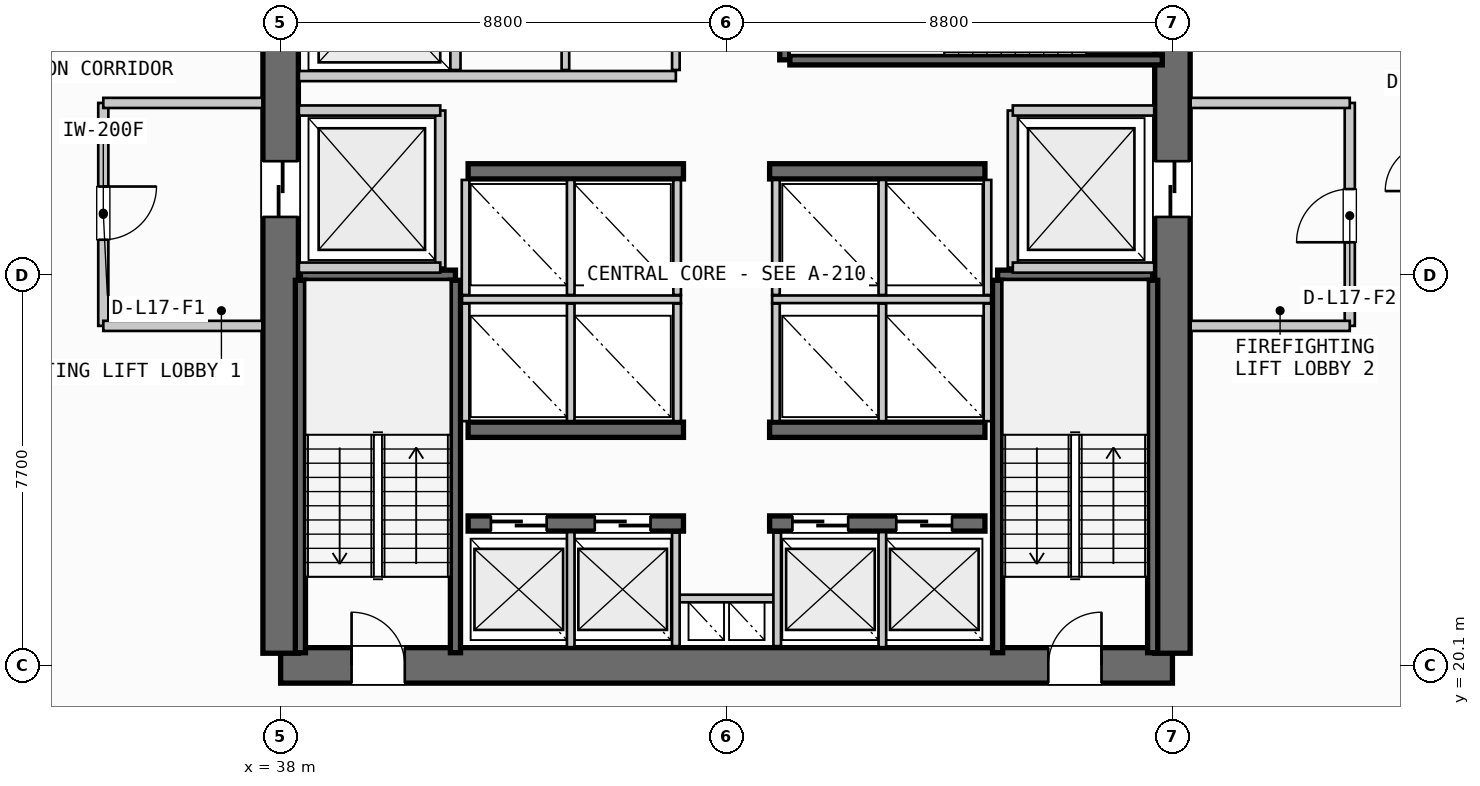
"""IFC4 building model, lengths in metres.
Left out: names, types, materials, properties, quantities, classifications, styles, units other than length and angle.
Written with IfcOpenShell. Run it as: python <this file> out.ifc"""

import sys

from ifc_helpers import new_model, si_unit, direction, frame, frame_2d, origin, place, context, subcontext, project, spatial, rectangle, extrude, source, transform, mapped, element, fill, save


model = new_model("IFC4")
c1 = context("Model", 3, precision=1e-05, world=origin(), true_north=direction((0.0, 1.0)))
c2 = subcontext(c1, "Body", "Model", "MODEL_VIEW")
j1 = project(units=[si_unit("LENGTHUNIT", "METRE"), si_unit("PLANEANGLEUNIT", "RADIAN")], contexts=[c1])
p1 = place(None, origin())
s1 = spatial("IfcSite", under=j1, at=p1, CompositionType="ELEMENT")
p2 = place(p1, origin())
s2 = spatial("IfcBuilding", under=s1, at=p2, CompositionType="ELEMENT")
p3 = place(p2, frame((0.0, 0.0, 71.4)))
s3 = spatial("IfcBuildingStorey", under=s2, at=p3, CompositionType="ELEMENT", Elevation=71.4)
p4 = place(p3, frame((38.0, 20.1, 0.0), z_axis=(0.0, 0.0, 1.0), x_axis=(1.0, 0.0, 0.0)))
e1 = element("IfcWall", 1, at=p4, inside=s3, PredefinedType="SHEAR", context=c2, shape_type="SweptSolid", body=[
    extrude(rectangle(XDim=17.6, YDim=0.7, at=frame_2d((8.8, 0.0))), origin(), (0.0, 0.0, 1.0), 3.54),
])
p5 = place(p4, frame((1.4, 0.0, 0.0)))
e2 = element("IfcOpeningElement", 2, at=p5, cuts=e1, PredefinedType="OPENING", context=c2, shape_type="SweptSolid", body=[
    extrude(rectangle(XDim=1.05, YDim=2.15, at=frame_2d((0.525, 1.075))), frame((0.0, 0.36, 0.0), z_axis=(0.0, -1.0, 0.0), x_axis=(1.0, 0.0, 0.0)), (0.0, 0.0, 1.0), 0.72),
])
p6 = place(p4, frame((15.15, 0.0, 0.0)))
e3 = element("IfcOpeningElement", 3, at=p6, cuts=e1, PredefinedType="OPENING", context=c2, shape_type="SweptSolid", body=[
    extrude(rectangle(XDim=1.05, YDim=2.15, at=frame_2d((0.525, 1.075))), frame((0.0, 0.36, 0.0), z_axis=(0.0, -1.0, 0.0), x_axis=(1.0, 0.0, 0.0)), (0.0, 0.0, 1.0), 0.72),
])
p7 = place(p3, frame((38.0, 35.26, 0.0), z_axis=(0.0, 0.0, 1.0), x_axis=(0.0, -1.0, 0.0)))
e4 = element("IfcWall", 4, at=p7, inside=s3, PredefinedType="SHEAR", context=c2, shape_type="SweptSolid", body=[
    extrude(rectangle(XDim=14.92, YDim=0.7, at=frame_2d((7.46, 0.0))), origin(), (0.0, 0.0, 1.0), 3.54),
])
p8 = place(p7, frame((5.21, 0.0, 0.0)))
e5 = element("IfcOpeningElement", 5, at=p8, cuts=e4, PredefinedType="OPENING", context=c2, shape_type="SweptSolid", body=[
    extrude(rectangle(XDim=1.1, YDim=2.2, at=frame_2d((0.55, 1.1))), frame((0.0, 0.36, 0.0), z_axis=(0.0, -1.0, 0.0), x_axis=(1.0, 0.0, 0.0)), (0.0, 0.0, 1.0), 0.72),
])
p9 = place(p3, frame((55.6, 20.34, 0.0), z_axis=(0.0, 0.0, 1.0), x_axis=(0.0, 1.0, 0.0)))
e6 = element("IfcWall", 6, at=p9, inside=s3, PredefinedType="SHEAR", context=c2, shape_type="SweptSolid", body=[
    extrude(rectangle(XDim=14.92, YDim=0.7, at=frame_2d((7.46, 0.0))), origin(), (0.0, 0.0, 1.0), 3.54),
])
p10 = place(p9, frame((12.71, 0.0, 0.0)))
e7 = element("IfcOpeningElement", 7, at=p10, cuts=e6, PredefinedType="OPENING", context=c2, shape_type="SweptSolid", body=[
    extrude(rectangle(XDim=1.05, YDim=2.15, at=frame_2d((0.525, 1.075))), frame((0.0, 0.36, 0.0), z_axis=(0.0, -1.0, 0.0), x_axis=(1.0, 0.0, 0.0)), (0.0, 0.0, 1.0), 0.72),
])
p11 = place(p9, frame((8.61, 0.0, 0.0)))
e8 = element("IfcOpeningElement", 8, at=p11, cuts=e6, PredefinedType="OPENING", context=c2, shape_type="SweptSolid", body=[
    extrude(rectangle(XDim=1.1, YDim=2.2, at=frame_2d((0.55, 1.1))), frame((0.0, 0.36, 0.0), z_axis=(0.0, -1.0, 0.0), x_axis=(1.0, 0.0, 0.0)), (0.0, 0.0, 1.0), 0.72),
])
p12 = place(p3, frame((41.7, 22.9, 0.0), z_axis=(0.0, 0.0, 1.0), x_axis=(1.0, 0.0, 0.0)))
e9 = element("IfcWall", 9, at=p12, inside=s3, PredefinedType="SHEAR", context=c2, shape_type="SweptSolid", body=[
    extrude(rectangle(XDim=4.25, YDim=0.3, at=frame_2d((2.125, 0.0))), origin(), (0.0, 0.0, 1.0), 3.54),
])
p13 = place(p12, frame((0.45, 0.0, 0.0)))
e10 = element("IfcOpeningElement", 10, at=p13, cuts=e9, PredefinedType="OPENING", context=c2, shape_type="SweptSolid", body=[
    extrude(rectangle(XDim=1.1, YDim=2.2, at=frame_2d((0.55, 1.1))), frame((0.0, 0.16, 0.0), z_axis=(0.0, -1.0, 0.0), x_axis=(1.0, 0.0, 0.0)), (0.0, 0.0, 1.0), 0.32),
])
p14 = place(p12, frame((2.5, 0.0, 0.0)))
e11 = element("IfcOpeningElement", 11, at=p14, cuts=e9, PredefinedType="OPENING", context=c2, shape_type="SweptSolid", body=[
    extrude(rectangle(XDim=1.1, YDim=2.2, at=frame_2d((0.55, 1.1))), frame((0.0, 0.16, 0.0), z_axis=(0.0, -1.0, 0.0), x_axis=(1.0, 0.0, 0.0)), (0.0, 0.0, 1.0), 0.32),
])
p15 = place(p3, frame((47.65, 22.9, 0.0), z_axis=(0.0, 0.0, 1.0), x_axis=(1.0, 0.0, 0.0)))
e12 = element("IfcWall", 12, at=p15, inside=s3, PredefinedType="SHEAR", context=c2, shape_type="SweptSolid", body=[
    extrude(rectangle(XDim=4.25, YDim=0.3, at=frame_2d((2.125, 0.0))), origin(), (0.0, 0.0, 1.0), 3.54),
])
p16 = place(p15, frame((0.45, 0.0, 0.0)))
e13 = element("IfcOpeningElement", 13, at=p16, cuts=e12, PredefinedType="OPENING", context=c2, shape_type="SweptSolid", body=[
    extrude(rectangle(XDim=1.1, YDim=2.2, at=frame_2d((0.55, 1.1))), frame((0.0, 0.16, 0.0), z_axis=(0.0, -1.0, 0.0), x_axis=(1.0, 0.0, 0.0)), (0.0, 0.0, 1.0), 0.32),
])
p17 = place(p15, frame((2.5, 0.0, 0.0)))
e14 = element("IfcOpeningElement", 14, at=p17, cuts=e12, PredefinedType="OPENING", context=c2, shape_type="SweptSolid", body=[
    extrude(rectangle(XDim=1.1, YDim=2.2, at=frame_2d((0.55, 1.1))), frame((0.0, 0.16, 0.0), z_axis=(0.0, -1.0, 0.0), x_axis=(1.0, 0.0, 0.0)), (0.0, 0.0, 1.0), 0.32),
])
for number, where, z_axis, x_axis in (
    (15, (41.7, 24.75, 0.0), (0.0, 0.0, 1.0), (1.0, 0.0, 0.0)),
    (16, (47.65, 24.75, 0.0), (0.0, 0.0, 1.0), (1.0, 0.0, 0.0)),
    (17, (41.7, 29.85, 0.0), (0.0, 0.0, 1.0), (1.0, 0.0, 0.0)),
    (18, (47.65, 29.85, 0.0), (0.0, 0.0, 1.0), (1.0, 0.0, 0.0)),
):
    element("IfcWall", number, at=place(p3, frame(where, z_axis=z_axis, x_axis=x_axis)), inside=s3, PredefinedType="SHEAR", context=c2, shape_type="SweptSolid", body=[
        extrude(rectangle(XDim=4.25, YDim=0.3, at=frame_2d((2.125, 0.0))), origin(), (0.0, 0.0, 1.0), 3.54),
    ])
p18 = place(p3, frame((38.39, 27.8, 0.0), z_axis=(0.0, 0.0, 1.0), x_axis=(1.0, 0.0, 0.0)))
e19 = element("IfcWall", 19, at=p18, inside=s3, PredefinedType="SHEAR", context=c2, shape_type="SweptSolid", body=[
    extrude(rectangle(XDim=3.06, YDim=0.2, at=frame_2d((1.53, 0.0))), origin(), (0.0, 0.0, 1.0), 3.54),
])
for number, where, z_axis, x_axis in (
    (20, (41.45, 27.7, 0.0), (0.0, 0.0, 1.0), (0.0, -1.0, 0.0)),
    (21, (38.39, 20.35, 0.0), (0.0, 0.0, 1.0), (0.0, 1.0, 0.0)),
):
    element("IfcWall", number, at=place(p3, frame(where, z_axis=z_axis, x_axis=x_axis)), inside=s3, PredefinedType="SHEAR", context=c2, shape_type="SweptSolid", body=[
        extrude(rectangle(XDim=7.35, YDim=0.2, at=frame_2d((3.675, 0.0))), origin(), (0.0, 0.0, 1.0), 3.54),
    ])
p19 = place(p3, frame((52.15, 27.8, 0.0), z_axis=(0.0, 0.0, 1.0), x_axis=(1.0, 0.0, 0.0)))
e22 = element("IfcWall", 22, at=p19, inside=s3, PredefinedType="SHEAR", context=c2, shape_type="SweptSolid", body=[
    extrude(rectangle(XDim=3.06, YDim=0.2, at=frame_2d((1.53, 0.0))), origin(), (0.0, 0.0, 1.0), 3.54),
])
for number, where, z_axis, x_axis in (
    (23, (55.21, 27.7, 0.0), (0.0, 0.0, 1.0), (0.0, -1.0, 0.0)),
    (24, (52.15, 20.35, 0.0), (0.0, 0.0, 1.0), (0.0, 1.0, 0.0)),
):
    element("IfcWall", number, at=place(p3, frame(where, z_axis=z_axis, x_axis=x_axis)), inside=s3, PredefinedType="SHEAR", context=c2, shape_type="SweptSolid", body=[
        extrude(rectangle(XDim=7.35, YDim=0.2, at=frame_2d((3.675, 0.0))), origin(), (0.0, 0.0, 1.0), 3.54),
    ])
p20 = place(p3, frame((47.95, 32.05, 0.0), z_axis=(0.0, 0.0, 1.0), x_axis=(0.0, 1.0, 0.0)))
e25 = element("IfcWall", 25, at=p20, inside=s3, PredefinedType="SHEAR", context=c2, shape_type="SweptSolid", body=[
    extrude(rectangle(XDim=3.06, YDim=0.2, at=frame_2d((1.53, 0.0))), origin(), (0.0, 0.0, 1.0), 3.54),
])
p21 = place(p3, frame((55.4, 32.05, 0.0), z_axis=(0.0, 0.0, 1.0), x_axis=(-1.0, 0.0, 0.0)))
e26 = element("IfcWall", 26, at=p21, inside=s3, PredefinedType="SHEAR", context=c2, shape_type="SweptSolid", body=[
    extrude(rectangle(XDim=7.35, YDim=0.2, at=frame_2d((3.675, 0.0))), origin(), (0.0, 0.0, 1.0), 3.54),
])
p22 = place(p3, frame((45.8, 21.42, 0.0), z_axis=(0.0, 0.0, 1.0), x_axis=(1.0, 0.0, 0.0)))
e27 = element("IfcWall", 27, at=p22, inside=s3, PredefinedType="PARTITIONING", context=c2, shape_type="SweptSolid", body=[
    extrude(rectangle(XDim=2.0, YDim=0.15, at=frame_2d((1.0, 0.0))), origin(), (0.0, 0.0, 1.0), 2.495),
])
for number, where, z_axis, x_axis in (
    (28, (45.8, 20.48, 0.0), (0.0, 0.0, 1.0), (0.0, 1.0, 0.0)),
    (29, (47.8, 20.48, 0.0), (0.0, 0.0, 1.0), (0.0, 1.0, 0.0)),
):
    element("IfcWall", number, at=place(p3, frame(where, z_axis=z_axis, x_axis=x_axis)), inside=s3, PredefinedType="PARTITIONING", context=c2, shape_type="SweptSolid", body=[
        extrude(rectangle(XDim=2.24, YDim=0.15, at=frame_2d((1.12, 0.0))), origin(), (0.0, 0.0, 1.0), 2.495),
    ])
p23 = place(p3, frame((41.15, 27.95, 0.0), z_axis=(0.0, 0.0, 1.0), x_axis=(0.0, 1.0, 0.0)))
e30 = element("IfcWall", 30, at=p23, inside=s3, PredefinedType="PARTITIONING", context=c2, shape_type="SweptSolid", body=[
    extrude(rectangle(XDim=3.1, YDim=0.2, at=frame_2d((1.55, 0.0))), origin(), (0.0, 0.0, 1.0), 2.495),
])
for number, where, z_axis, x_axis in (
    (31, (38.36, 27.95, 0.0), (0.0, 0.0, 1.0), (1.0, 0.0, 0.0)),
    (32, (38.36, 31.05, 0.0), (0.0, 0.0, 1.0), (1.0, 0.0, 0.0)),
):
    element("IfcWall", number, at=place(p3, frame(where, z_axis=z_axis, x_axis=x_axis)), inside=s3, PredefinedType="PARTITIONING", context=c2, shape_type="SweptSolid", body=[
        extrude(rectangle(XDim=2.79, YDim=0.2, at=frame_2d((1.395, 0.0))), origin(), (0.0, 0.0, 1.0), 2.495),
    ])
p24 = place(p3, frame((34.5, 31.2, 0.0), z_axis=(0.0, 0.0, 1.0), x_axis=(0.0, -1.0, 0.0)))
e33 = element("IfcWall", 33, at=p24, inside=s3, PredefinedType="PARTITIONING", context=c2, shape_type="SweptSolid", body=[
    extrude(rectangle(XDim=4.4, YDim=0.2, at=frame_2d((2.2, 0.0))), origin(), (0.0, 0.0, 1.0), 2.495),
])
p25 = place(p24, frame((1.65, 0.0, 0.0)))
e34 = element("IfcOpeningElement", 34, at=p25, cuts=e33, PredefinedType="OPENING", context=c2, shape_type="SweptSolid", body=[
    extrude(rectangle(XDim=1.05, YDim=2.15, at=frame_2d((0.525, 1.075))), frame((0.0, 0.11, 0.0), z_axis=(0.0, -1.0, 0.0), x_axis=(1.0, 0.0, 0.0)), (0.0, 0.0, 1.0), 0.22),
])
for number, where, z_axis, x_axis in (
    (35, (34.5, 26.8, 0.0), (0.0, 0.0, 1.0), (1.0, 0.0, 0.0)),
    (36, (34.5, 31.2, 0.0), (0.0, 0.0, 1.0), (1.0, 0.0, 0.0)),
):
    element("IfcWall", number, at=place(p3, frame(where, z_axis=z_axis, x_axis=x_axis)), inside=s3, PredefinedType="PARTITIONING", context=c2, shape_type="SweptSolid", body=[
        extrude(rectangle(XDim=3.14, YDim=0.2, at=frame_2d((1.57, 0.0))), origin(), (0.0, 0.0, 1.0), 2.495),
    ])
p26 = place(p3, frame((52.45, 27.95, 0.0), z_axis=(0.0, 0.0, 1.0), x_axis=(0.0, 1.0, 0.0)))
e37 = element("IfcWall", 37, at=p26, inside=s3, PredefinedType="PARTITIONING", context=c2, shape_type="SweptSolid", body=[
    extrude(rectangle(XDim=3.1, YDim=0.2, at=frame_2d((1.55, 0.0))), origin(), (0.0, 0.0, 1.0), 2.495),
])
for number, where, z_axis, x_axis in (
    (38, (52.45, 27.95, 0.0), (0.0, 0.0, 1.0), (1.0, 0.0, 0.0)),
    (39, (52.45, 31.05, 0.0), (0.0, 0.0, 1.0), (1.0, 0.0, 0.0)),
):
    element("IfcWall", number, at=place(p3, frame(where, z_axis=z_axis, x_axis=x_axis)), inside=s3, PredefinedType="PARTITIONING", context=c2, shape_type="SweptSolid", body=[
        extrude(rectangle(XDim=2.79, YDim=0.2, at=frame_2d((1.395, 0.0))), origin(), (0.0, 0.0, 1.0), 2.495),
    ])
p27 = place(p3, frame((59.1, 26.8, 0.0), z_axis=(0.0, 0.0, 1.0), x_axis=(0.0, 1.0, 0.0)))
e40 = element("IfcWall", 40, at=p27, inside=s3, PredefinedType="PARTITIONING", context=c2, shape_type="SweptSolid", body=[
    extrude(rectangle(XDim=4.4, YDim=0.2, at=frame_2d((2.2, 0.0))), origin(), (0.0, 0.0, 1.0), 2.495),
])
p28 = place(p27, frame((1.65, 0.0, 0.0)))
e41 = element("IfcOpeningElement", 41, at=p28, cuts=e40, PredefinedType="OPENING", context=c2, shape_type="SweptSolid", body=[
    extrude(rectangle(XDim=1.05, YDim=2.15, at=frame_2d((0.525, 1.075))), frame((0.0, 0.11, 0.0), z_axis=(0.0, -1.0, 0.0), x_axis=(1.0, 0.0, 0.0)), (0.0, 0.0, 1.0), 0.22),
])
for number, where, z_axis, x_axis in (
    (42, (55.96, 26.8, 0.0), (0.0, 0.0, 1.0), (1.0, 0.0, 0.0)),
    (43, (55.96, 31.2, 0.0), (0.0, 0.0, 1.0), (1.0, 0.0, 0.0)),
):
    element("IfcWall", number, at=place(p3, frame(where, z_axis=z_axis, x_axis=x_axis)), inside=s3, PredefinedType="PARTITIONING", context=c2, shape_type="SweptSolid", body=[
        extrude(rectangle(XDim=3.14, YDim=0.2, at=frame_2d((1.57, 0.0))), origin(), (0.0, 0.0, 1.0), 2.495),
    ])
for number, where, z_axis, x_axis in (
    (44, (43.725, 20.46, 0.0), (0.0, 0.0, 1.0), (0.0, 1.0, 0.0)),
    (45, (49.875, 20.46, 0.0), (0.0, 0.0, 1.0), (0.0, 1.0, 0.0)),
):
    element("IfcWall", number, at=place(p3, frame(where, z_axis=z_axis, x_axis=x_axis)), inside=s3, PredefinedType="PARTITIONING", context=c2, shape_type="SweptSolid", body=[
        extrude(rectangle(XDim=2.27, YDim=0.15, at=frame_2d((1.135, 0.0))), origin(), (0.0, 0.0, 1.0), 2.495),
    ])
p29 = place(p3, frame((41.58, 27.325, 0.0), z_axis=(0.0, 0.0, 1.0), x_axis=(1.0, 0.0, 0.0)))
e46 = element("IfcWall", 46, at=p29, inside=s3, PredefinedType="PARTITIONING", context=c2, shape_type="SweptSolid", body=[
    extrude(rectangle(XDim=4.32, YDim=0.15, at=frame_2d((2.16, 0.0))), origin(), (0.0, 0.0, 1.0), 2.495),
])
p30 = place(p3, frame((47.7, 27.325, 0.0), z_axis=(0.0, 0.0, 1.0), x_axis=(1.0, 0.0, 0.0)))
e47 = element("IfcWall", 47, at=p30, inside=s3, PredefinedType="PARTITIONING", context=c2, shape_type="SweptSolid", body=[
    extrude(rectangle(XDim=4.32, YDim=0.15, at=frame_2d((2.16, 0.0))), origin(), (0.0, 0.0, 1.0), 2.495),
])
for number, where, z_axis, x_axis in (
    (48, (41.65, 24.92, 0.0), (0.0, 0.0, 1.0), (0.0, 1.0, 0.0)),
    (49, (43.725, 24.92, 0.0), (0.0, 0.0, 1.0), (0.0, 1.0, 0.0)),
    (50, (45.825, 24.92, 0.0), (0.0, 0.0, 1.0), (0.0, 1.0, 0.0)),
    (51, (47.775, 24.92, 0.0), (0.0, 0.0, 1.0), (0.0, 1.0, 0.0)),
    (52, (49.875, 24.92, 0.0), (0.0, 0.0, 1.0), (0.0, 1.0, 0.0)),
    (53, (51.95, 24.92, 0.0), (0.0, 0.0, 1.0), (0.0, 1.0, 0.0)),
):
    element("IfcWall", number, at=place(p3, frame(where, z_axis=z_axis, x_axis=x_axis)), inside=s3, PredefinedType="PARTITIONING", context=c2, shape_type="SweptSolid", body=[
        extrude(rectangle(XDim=2.32, YDim=0.15, at=frame_2d((1.16, 0.0))), origin(), (0.0, 0.0, 1.0), 2.495),
    ])
for number, where, z_axis, x_axis in (
    (54, (41.65, 27.41, 0.0), (0.0, 0.0, 1.0), (0.0, 1.0, 0.0)),
    (55, (43.725, 27.41, 0.0), (0.0, 0.0, 1.0), (0.0, 1.0, 0.0)),
    (56, (45.825, 27.41, 0.0), (0.0, 0.0, 1.0), (0.0, 1.0, 0.0)),
    (57, (47.775, 27.41, 0.0), (0.0, 0.0, 1.0), (0.0, 1.0, 0.0)),
    (58, (49.875, 27.41, 0.0), (0.0, 0.0, 1.0), (0.0, 1.0, 0.0)),
    (59, (51.95, 27.41, 0.0), (0.0, 0.0, 1.0), (0.0, 1.0, 0.0)),
):
    element("IfcWall", number, at=place(p3, frame(where, z_axis=z_axis, x_axis=x_axis)), inside=s3, PredefinedType="PARTITIONING", context=c2, shape_type="SweptSolid", body=[
        extrude(rectangle(XDim=2.27, YDim=0.15, at=frame_2d((1.135, 0.0))), origin(), (0.0, 0.0, 1.0), 2.495),
    ])
p31 = place(p3, frame((41.45, 31.85, 0.0), z_axis=(0.0, 0.0, 1.0), x_axis=(0.0, 1.0, 0.0)))
e60 = element("IfcWall", 60, at=p31, inside=s3, PredefinedType="PARTITIONING", context=c2, shape_type="SweptSolid", body=[
    extrude(rectangle(XDim=3.29, YDim=0.2, at=frame_2d((1.645, 0.0))), origin(), (0.0, 0.0, 1.0), 2.495),
])
p32 = place(p3, frame((38.36, 31.73, 0.0), z_axis=(0.0, 0.0, 1.0), x_axis=(1.0, 0.0, 0.0)))
e61 = element("IfcWall", 61, at=p32, inside=s3, PredefinedType="PARTITIONING", context=c2, shape_type="SweptSolid", body=[
    extrude(rectangle(XDim=7.44, YDim=0.2, at=frame_2d((3.72, 0.0))), origin(), (0.0, 0.0, 1.0), 2.495),
])
p33 = place(p3, frame((45.8, 31.85, 0.0), z_axis=(0.0, 0.0, 1.0), x_axis=(0.0, 1.0, 0.0)))
e62 = element("IfcWall", 62, at=p33, inside=s3, PredefinedType="PARTITIONING", context=c2, shape_type="SweptSolid", body=[
    extrude(rectangle(XDim=3.29, YDim=0.15, at=frame_2d((1.645, 0.0))), origin(), (0.0, 0.0, 1.0), 2.495),
])
p34 = place(p3, frame((43.62, 31.85, 0.0), z_axis=(0.0, 0.0, 1.0), x_axis=(0.0, 1.0, 0.0)))
e63 = element("IfcWall", 63, at=p34, inside=s3, PredefinedType="PLUMBINGWALL", context=c2, shape_type="SweptSolid", body=[
    extrude(rectangle(XDim=3.29, YDim=0.15, at=frame_2d((1.645, 0.0))), origin(), (0.0, 0.0, 1.0), 2.495),
])
m1 = source(origin(), c2, "Body", "SweptSolid", [
    extrude(rectangle(XDim=1.05, YDim=2.15, at=frame_2d((0.525, 1.075))), frame((0.0, 0.025, 0.0), z_axis=(0.0, -1.0, 0.0), x_axis=(1.0, 0.0, 0.0)), (0.0, 0.0, 1.0), 0.05),
])
p35 = place(p5, origin())
e64 = element("IfcDoor", 64, at=p35, inside=s3, OperationType="SINGLE_SWING_LEFT", PredefinedType="DOOR", context=c2, shape_type="MappedRepresentation", body=[
    mapped(m1, transform((0.0, 0.0, 0.0), scale=1.0)),
])
fill(e2, e64)
p36 = place(p6, origin())
e65 = element("IfcDoor", 65, at=p36, inside=s3, OperationType="SINGLE_SWING_RIGHT", PredefinedType="DOOR", context=c2, shape_type="MappedRepresentation", body=[
    mapped(m1, transform((0.0, 0.0, 0.0), scale=1.0)),
])
fill(e3, e65)
m2 = source(origin(), c2, "Body", "SweptSolid", [
    extrude(rectangle(XDim=1.1, YDim=2.2, at=frame_2d((0.55, 1.1))), frame((0.0, 0.025, 0.0), z_axis=(0.0, -1.0, 0.0), x_axis=(1.0, 0.0, 0.0)), (0.0, 0.0, 1.0), 0.05),
])
p37 = place(p8, origin())
e66 = element("IfcDoor", 66, at=p37, inside=s3, OperationType="SLIDING_TO_LEFT", PredefinedType="DOOR", context=c2, shape_type="MappedRepresentation", body=[
    mapped(m2, transform((0.0, 0.0, 0.0), scale=1.0)),
])
fill(e5, e66)
p38 = place(p11, origin())
e67 = element("IfcDoor", 67, at=p38, inside=s3, OperationType="SLIDING_TO_RIGHT", PredefinedType="DOOR", context=c2, shape_type="MappedRepresentation", body=[
    mapped(m2, transform((0.0, 0.0, 0.0), scale=1.0)),
])
fill(e8, e67)
p39 = place(p13, origin())
e68 = element("IfcDoor", 68, at=p39, inside=s3, OperationType="SLIDING_TO_LEFT", PredefinedType="DOOR", context=c2, shape_type="MappedRepresentation", body=[
    mapped(m2, transform((0.0, 0.0, 0.0), scale=1.0)),
])
fill(e10, e68)
p40 = place(p14, origin())
e69 = element("IfcDoor", 69, at=p40, inside=s3, OperationType="SLIDING_TO_LEFT", PredefinedType="DOOR", context=c2, shape_type="MappedRepresentation", body=[
    mapped(m2, transform((0.0, 0.0, 0.0), scale=1.0)),
])
fill(e11, e69)
p41 = place(p16, origin())
e70 = element("IfcDoor", 70, at=p41, inside=s3, OperationType="SLIDING_TO_LEFT", PredefinedType="DOOR", context=c2, shape_type="MappedRepresentation", body=[
    mapped(m2, transform((0.0, 0.0, 0.0), scale=1.0)),
])
fill(e13, e70)
p42 = place(p17, origin())
e71 = element("IfcDoor", 71, at=p42, inside=s3, OperationType="SLIDING_TO_LEFT", PredefinedType="DOOR", context=c2, shape_type="MappedRepresentation", body=[
    mapped(m2, transform((0.0, 0.0, 0.0), scale=1.0)),
])
fill(e14, e71)
p43 = place(p25, origin())
e72 = element("IfcDoor", 72, at=p43, inside=s3, OperationType="SINGLE_SWING_LEFT", PredefinedType="DOOR", context=c2, shape_type="MappedRepresentation", body=[
    mapped(m1, transform((0.0, 0.0, 0.0), scale=1.0)),
])
fill(e34, e72)
p44 = place(p28, origin())
e73 = element("IfcDoor", 73, at=p44, inside=s3, OperationType="SINGLE_SWING_LEFT", PredefinedType="DOOR", context=c2, shape_type="MappedRepresentation", body=[
    mapped(m1, transform((0.0, 0.0, 0.0), scale=1.0)),
])
fill(e41, e73)
save(model, sys.argv[1])
